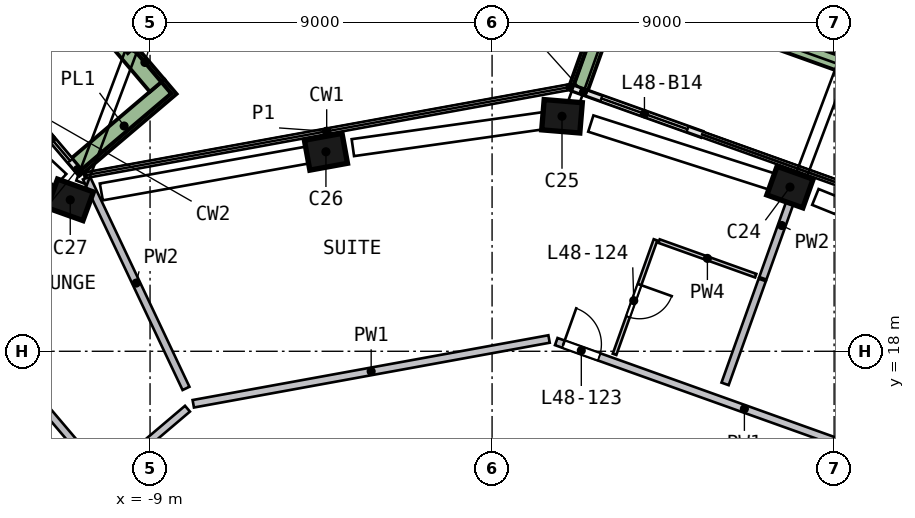
"""IFC4 building model, lengths in metres.
Left out: names, types, materials, properties, quantities, classifications, styles, units other than length and angle.
Written with IfcOpenShell. Run it as: python <this file> out.ifc"""

import sys

from ifc_helpers import new_model, si_unit, direction, frame, frame_2d, origin, origin_2d, place, context, subcontext, project, spatial, rectangle, extrude, element, fill, save


model = new_model("IFC4")
c1 = context("Model", 3, precision=1e-05, world=origin(), true_north=direction((0.0, 1.0)))
c2 = subcontext(c1, "Body", "Model", "MODEL_VIEW")
j1 = project(units=[si_unit("LENGTHUNIT", "METRE"), si_unit("PLANEANGLEUNIT", "RADIAN")], contexts=[c1])
p1 = place(None, origin())
s1 = spatial("IfcSite", under=j1, at=p1, CompositionType="ELEMENT")
p2 = place(p1, origin())
s2 = spatial("IfcBuilding", under=s1, at=p2, CompositionType="ELEMENT")
p3 = place(p2, frame((0.0, 0.0, 197.5)))
s3 = spatial("IfcBuildingStorey", under=s2, at=p3, CompositionType="ELEMENT", Elevation=197.5)
p4 = place(p3, frame((7.967, 22.276, 0.0), z_axis=(-0.106239847, 0.037035652, 0.99365057), x_axis=(-0.935464206, 0.33503593, -0.112506199)))
e1 = element("IfcColumn", 1, at=p4, inside=s3, PredefinedType="COLUMN", context=c2, shape_type="SweptSolid", body=[
    extrude(rectangle(XDim=1.0, YDim=0.8, at=origin_2d()), origin(), (0.0, 0.0, 1.0), 3.21),
])
p5 = place(p3, frame((1.979, 24.174, 0.0), z_axis=(-0.115023924, 0.008514659, 0.993326229), x_axis=(0.989957987, -0.08173816, 0.115334541)))
e2 = element("IfcColumn", 2, at=p5, inside=s3, PredefinedType="COLUMN", context=c2, shape_type="SweptSolid", body=[
    extrude(rectangle(XDim=1.0, YDim=0.8, at=origin_2d()), origin(), (0.0, 0.0, 1.0), 3.211),
])
p6 = place(p3, frame((-4.238, 23.276, 0.0), z_axis=(-0.110573955, -0.021065327, 0.993644631), x_axis=(-0.977632783, -0.177664557, -0.112558637)))
e3 = element("IfcColumn", 3, at=p6, inside=s3, PredefinedType="COLUMN", context=c2, shape_type="SweptSolid", body=[
    extrude(rectangle(XDim=1.0, YDim=0.8, at=origin_2d()), origin(), (0.0, 0.0, 1.0), 3.21),
])
p7 = place(p3, frame((-10.974, 22.049, 0.0), z_axis=(-0.104359304, -0.053053747, 0.993123575), x_axis=(0.936274883, -0.342010136, 0.080114981)))
e4 = element("IfcColumn", 4, at=p7, inside=s3, PredefinedType="COLUMN", context=c2, shape_type="SweptSolid", body=[
    extrude(rectangle(XDim=1.0, YDim=0.8, at=origin_2d()), origin(), (0.0, 0.0, 1.0), 3.212),
])
p8 = place(p3, frame((-10.843, 22.706, 0.0), z_axis=(0.0, 0.0, 1.0), x_axis=(-0.647100675, 0.762404562, 0.0)))
e5 = element("IfcWall", 5, at=p8, inside=s3, PredefinedType="SOLIDWALL", context=c2, shape_type="SweptSolid", body=[
    extrude(rectangle(XDim=2.304, YDim=0.15, at=frame_2d((1.152, 0.0))), origin(), (0.0, 0.0, 1.0), 2.475),
])
p9 = place(p8, frame((0.404, 0.0, 0.0)))
e6 = element("IfcOpeningElement", 6, at=p9, cuts=e5, PredefinedType="OPENING", context=c2, shape_type="SweptSolid", body=[
    extrude(rectangle(XDim=1.5, YDim=2.4, at=frame_2d((0.75, 1.2))), frame((0.0, 0.085, 0.0), z_axis=(0.0, -1.0, 0.0), x_axis=(1.0, 0.0, 0.0)), (0.0, 0.0, 1.0), 0.17),
])
p10 = place(p3, frame((5.516, 23.711, 0.0), z_axis=(0.0, 0.0, 1.0), x_axis=(-0.941585689, 0.336773499, 0.0)))
e7 = element("IfcWall", 7, at=p10, inside=s3, PredefinedType="SOLIDWALL", context=c2, shape_type="SweptSolid", body=[
    extrude(rectangle(XDim=3.609, YDim=0.15, at=frame_2d((1.804, 0.0))), origin(), (0.0, 0.0, 1.0), 2.475),
])
p11 = place(p10, frame((0.4, 0.0, 0.0)))
e8 = element("IfcOpeningElement", 8, at=p11, cuts=e7, PredefinedType="OPENING", context=c2, shape_type="SweptSolid", body=[
    extrude(rectangle(XDim=2.4, YDim=2.4, at=frame_2d((1.2, 1.2))), frame((0.0, 0.085, 0.0), z_axis=(0.0, -1.0, 0.0), x_axis=(1.0, 0.0, 0.0)), (0.0, 0.0, 1.0), 0.17),
])
p12 = place(p3, frame((15.964, 23.187, 0.0), z_axis=(0.0, 0.0, 1.0), x_axis=(-0.941588869, 0.33676461, 0.0)))
e9 = element("IfcWall", 9, at=p12, inside=s3, PredefinedType="SOLIDWALL", context=c2, shape_type="SweptSolid", body=[
    extrude(rectangle(XDim=13.723, YDim=0.5, at=frame_2d((6.862, 0.0))), origin(), (0.0, 0.0, 1.0), 0.7),
])
p13 = place(p3, frame((3.194, 27.489, 0.0), z_axis=(0.0, 0.0, 1.0), x_axis=(-0.336748919, -0.94159448, 0.0)))
e10 = element("IfcWall", 10, at=p13, inside=s3, PredefinedType="SOLIDWALL", context=c2, shape_type="SweptSolid", body=[
    extrude(rectangle(XDim=2.699, YDim=0.5, at=frame_2d((1.35, 0.0))), origin(), (0.0, 0.0, 1.0), 0.7),
])
p14 = place(p3, frame((-10.902, 22.893, 0.0), z_axis=(0.0, 0.0, 1.0), x_axis=(0.762447521, 0.647050058, 0.0)))
e11 = element("IfcWall", 11, at=p14, inside=s3, PredefinedType="SOLIDWALL", context=c2, shape_type="SweptSolid", body=[
    extrude(rectangle(XDim=3.199, YDim=0.5, at=frame_2d((1.6, 0.0))), origin(), (0.0, 0.0, 1.0), 0.7),
])
p15 = place(p3, frame((-8.815, 24.991, 0.0), z_axis=(0.0, 0.0, 1.0), x_axis=(-0.647072265, 0.762428675, 0.0)))
e12 = element("IfcWall", 12, at=p15, inside=s3, PredefinedType="SOLIDWALL", context=c2, shape_type="SweptSolid", body=[
    extrude(rectangle(XDim=4.491, YDim=0.5, at=frame_2d((2.246, 0.0))), origin(), (0.0, 0.0, 1.0), 0.7),
])
p16 = place(p3, frame((-15.119, 10.461, 0.0), z_axis=(0.0, 0.0, 1.0), x_axis=(0.762438227, 0.64706101, 0.0)))
e13 = element("IfcWall", 13, at=p16, inside=s3, PredefinedType="SOLIDWALL", context=c2, shape_type="SweptSolid", body=[
    extrude(rectangle(XDim=9.317, YDim=0.2, at=frame_2d((4.658, 0.0))), origin(), (0.0, 0.0, 1.0), 3.19),
])
p17 = place(p16, frame((3.853, 0.0, 0.0)))
e14 = element("IfcOpeningElement", 14, at=p17, cuts=e13, PredefinedType="OPENING", context=c2, shape_type="SweptSolid", body=[
    extrude(rectangle(XDim=1.8, YDim=2.1, at=frame_2d((0.9, 1.05))), frame((0.0, 0.11, 0.0), z_axis=(0.0, -1.0, 0.0), x_axis=(1.0, 0.0, 0.0)), (0.0, 0.0, 1.0), 0.22),
])
p18 = place(p3, frame((1.5, 18.323, 0.0), z_axis=(0.0, 0.0, 1.0), x_axis=(-0.983821025, -0.179154099, 0.0)))
e15 = element("IfcWall", 15, at=p18, inside=s3, PredefinedType="SOLIDWALL", context=c2, shape_type="SweptSolid", body=[
    extrude(rectangle(XDim=9.516, YDim=0.2, at=frame_2d((4.758, 0.0))), origin(), (0.0, 0.0, 1.0), 3.19),
])
p19 = place(p3, frame((1.689, 18.256, 0.0), z_axis=(0.0, 0.0, 1.0), x_axis=(0.941589725, -0.336762215, 0.0)))
e16 = element("IfcWall", 16, at=p19, inside=s3, PredefinedType="SOLIDWALL", context=c2, shape_type="SweptSolid", body=[
    extrude(rectangle(XDim=9.116, YDim=0.2, at=frame_2d((4.558, 0.0))), origin(), (0.0, 0.0, 1.0), 3.19),
])
p20 = place(p19, frame((0.2, 0.0, 0.0)))
e17 = element("IfcOpeningElement", 17, at=p20, cuts=e16, PredefinedType="OPENING", context=c2, shape_type="SweptSolid", body=[
    extrude(rectangle(XDim=1.0, YDim=2.1, at=frame_2d((0.5, 1.05))), frame((0.0, 0.11, 0.0), z_axis=(0.0, -1.0, 0.0), x_axis=(1.0, 0.0, 0.0)), (0.0, 0.0, 1.0), 0.22),
])
p21 = place(p3, frame((-19.856, 26.037, 0.0), z_axis=(0.0, 0.0, 1.0), x_axis=(0.64706411, -0.762435596, 0.0)))
e18 = element("IfcWall", 18, at=p21, inside=s3, PredefinedType="SOLIDWALL", context=c2, shape_type="SweptSolid", body=[
    extrude(rectangle(XDim=14.741, YDim=0.2, at=frame_2d((7.371, 0.0))), origin(), (0.0, 0.0, 1.0), 3.19),
])
p22 = place(p21, frame((4.65, 0.0, 0.0)))
e19 = element("IfcOpeningElement", 19, at=p22, cuts=e18, PredefinedType="OPENING", context=c2, shape_type="SweptSolid", body=[
    extrude(rectangle(XDim=1.0, YDim=2.1, at=frame_2d((0.5, 1.05))), frame((0.0, 0.11, 0.0), z_axis=(0.0, -1.0, 0.0), x_axis=(1.0, 0.0, 0.0)), (0.0, 0.0, 1.0), 0.22),
])
p23 = place(p3, frame((-10.677, 22.566, 0.0), z_axis=(0.0, 0.0, 1.0), x_axis=(0.427678976, -0.903930691, 0.0)))
e20 = element("IfcWall", 20, at=p23, inside=s3, PredefinedType="SOLIDWALL", context=c2, shape_type="SweptSolid", body=[
    extrude(rectangle(XDim=6.132, YDim=0.2, at=frame_2d((3.066, 0.0))), origin(), (0.0, 0.0, 1.0), 3.19),
])
p24 = place(p3, frame((6.131, 17.142, 0.0), z_axis=(0.0, 0.0, 1.0), x_axis=(0.336778275, 0.941583981, 0.0)))
e21 = element("IfcWall", 21, at=p24, inside=s3, PredefinedType="SOLIDWALL", context=c2, shape_type="SweptSolid", body=[
    extrude(rectangle(XDim=2.905, YDim=0.2, at=frame_2d((1.452, 0.0))), origin(), (0.0, 0.0, 1.0), 3.19),
])
p25 = place(p3, frame((7.125, 19.92, 0.0), z_axis=(0.0, 0.0, 1.0), x_axis=(0.336744989, 0.941595886, 0.0)))
e22 = element("IfcWall", 22, at=p25, inside=s3, PredefinedType="SOLIDWALL", context=c2, shape_type="SweptSolid", body=[
    extrude(rectangle(XDim=2.952, YDim=0.2, at=frame_2d((1.476, 0.0))), origin(), (0.0, 0.0, 1.0), 3.19),
])
p26 = place(p3, frame((4.301, 20.933, 0.0), z_axis=(0.0, 0.0, 1.0), x_axis=(-0.336843833, -0.94156053, 0.0)))
e23 = element("IfcWall", 23, at=p26, inside=s3, PredefinedType="PARTITIONING", context=c2, shape_type="SweptSolid", body=[
    extrude(rectangle(XDim=3.2, YDim=0.1, at=frame_2d((1.6, 0.0))), origin(), (0.0, 0.0, 1.0), 3.19),
])
p27 = place(p26, frame((1.25, 0.0, 0.0)))
e24 = element("IfcOpeningElement", 24, at=p27, cuts=e23, PredefinedType="OPENING", context=c2, shape_type="SweptSolid", body=[
    extrude(rectangle(XDim=0.9, YDim=2.1, at=frame_2d((0.45, 1.05))), frame((0.0, 0.06, 0.0), z_axis=(0.0, -1.0, 0.0), x_axis=(1.0, 0.0, 0.0)), (0.0, 0.0, 1.0), 0.12),
])
p28 = place(p3, frame((4.395, 20.899, 0.0), z_axis=(0.0, 0.0, 1.0), x_axis=(0.941567897, -0.336823242, 0.0)))
e25 = element("IfcWall", 25, at=p28, inside=s3, PredefinedType="PARTITIONING", context=c2, shape_type="SweptSolid", body=[
    extrude(rectangle(XDim=2.7, YDim=0.1, at=frame_2d((1.35, 0.0))), origin(), (0.0, 0.0, 1.0), 3.19),
])
p29 = place(p9, origin())
e26 = element("IfcDoor", 26, at=p29, inside=s3, OperationType="SLIDING_TO_LEFT", PredefinedType="DOOR", context=c2, shape_type="SweptSolid", body=[
    extrude(rectangle(XDim=1.5, YDim=2.4, at=frame_2d((0.75, 1.2))), frame((0.0, 0.025, 0.0), z_axis=(0.0, -1.0, 0.0), x_axis=(1.0, 0.0, 0.0)), (0.0, 0.0, 1.0), 0.05),
])
fill(e6, e26)
p30 = place(p11, origin())
e27 = element("IfcDoor", 27, at=p30, inside=s3, OperationType="SLIDING_TO_RIGHT", PredefinedType="DOOR", context=c2, shape_type="SweptSolid", body=[
    extrude(rectangle(XDim=2.4, YDim=2.4, at=frame_2d((1.2, 1.2))), frame((0.0, 0.025, 0.0), z_axis=(0.0, -1.0, 0.0), x_axis=(1.0, 0.0, 0.0)), (0.0, 0.0, 1.0), 0.05),
])
fill(e8, e27)
p31 = place(p20, origin())
e28 = element("IfcDoor", 28, at=p31, inside=s3, OperationType="SINGLE_SWING_LEFT", PredefinedType="DOOR", context=c2, shape_type="SweptSolid", body=[
    extrude(rectangle(XDim=1.0, YDim=2.1, at=frame_2d((0.5, 1.05))), frame((0.0, 0.025, 0.0), z_axis=(0.0, -1.0, 0.0), x_axis=(1.0, 0.0, 0.0)), (0.0, 0.0, 1.0), 0.05),
])
fill(e17, e28)
p32 = place(p27, origin())
e29 = element("IfcDoor", 29, at=p32, inside=s3, OperationType="SINGLE_SWING_LEFT", PredefinedType="DOOR", context=c2, shape_type="SweptSolid", body=[
    extrude(rectangle(XDim=0.9, YDim=2.1, at=frame_2d((0.45, 1.05))), frame((0.0, 0.025, 0.0), z_axis=(0.0, -1.0, 0.0), x_axis=(1.0, 0.0, 0.0)), (0.0, 0.0, 1.0), 0.05),
])
fill(e24, e29)
save(model, sys.argv[1])
